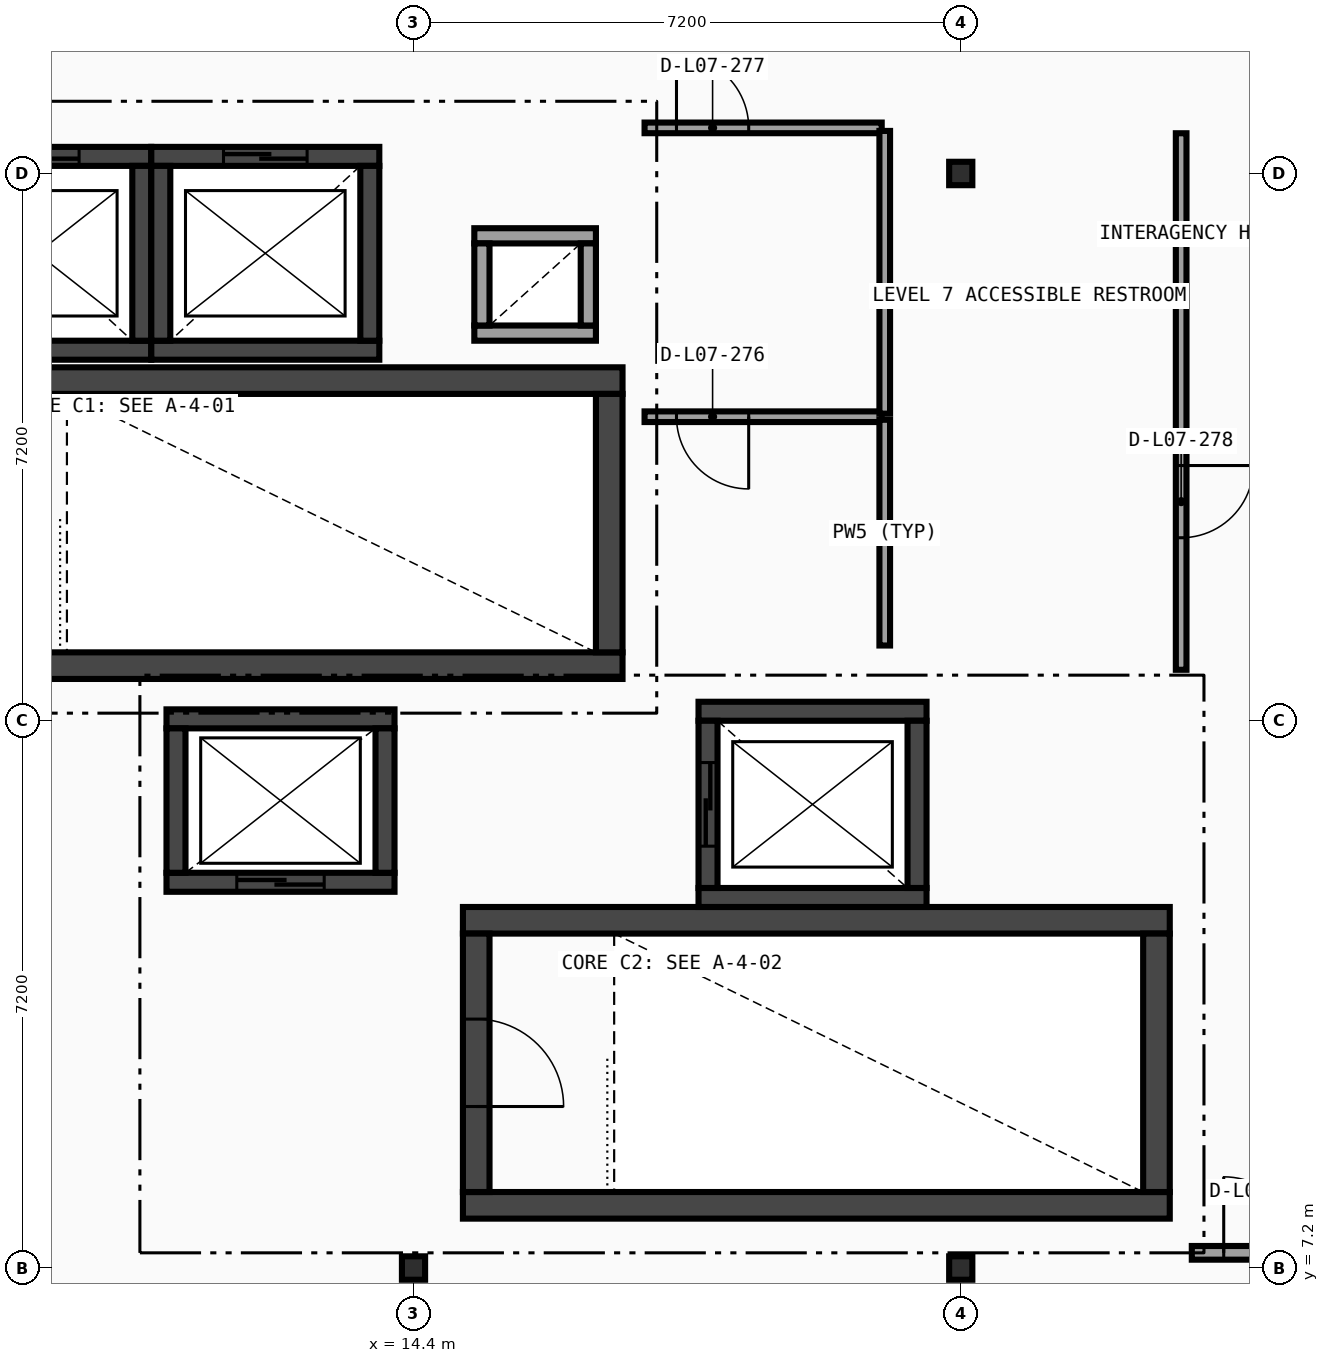
"""IFC4 building model, lengths in metres.
Left out: names, types, materials, properties, quantities, classifications, styles, units other than length and angle.
Written with IfcOpenShell. Run it as: python <this file> out.ifc"""

import sys

from ifc_helpers import new_model, si_unit, direction, frame, frame_2d, origin, origin_2d, place, context, subcontext, project, spatial, rectangle, i_section, extrude, element, fill, save


model = new_model("IFC4")
c1 = context("Model", 3, precision=1e-05, world=origin(), true_north=direction((0.0, 1.0)))
c2 = subcontext(c1, "Body", "Model", "MODEL_VIEW")
j1 = project(units=[si_unit("LENGTHUNIT", "METRE"), si_unit("PLANEANGLEUNIT", "RADIAN")], contexts=[c1])
p1 = place(None, origin())
s1 = spatial("IfcSite", under=j1, at=p1, CompositionType="ELEMENT")
p2 = place(p1, origin())
s2 = spatial("IfcBuilding", under=s1, at=p2, CompositionType="ELEMENT")
p3 = place(p2, frame((0.0, 0.0, 31.05)))
s3 = spatial("IfcBuildingStorey", under=s2, at=p3, CompositionType="ELEMENT", Elevation=31.05)
for number, where, z_axis, x_axis in (
    (1, (14.4, 7.2, 0.0), (0.0, 0.0, 1.0), (1.0, 0.0, 0.0)),
    (2, (21.6, 7.2, 0.0), (0.0, 0.0, 1.0), (1.0, 0.0, 0.0)),
    (3, (21.6, 21.6, 0.0), (0.0, 0.0, 1.0), (1.0, 0.0, 0.0)),
):
    element("IfcColumn", number, at=place(p3, frame(where, z_axis=z_axis, x_axis=x_axis)), inside=s3, PredefinedType="COLUMN", context=c2, shape_type="SweptSolid", body=[
        extrude(i_section(OverallWidth=0.305, OverallDepth=0.308, WebThickness=0.01, FlangeThickness=0.015, FilletRadius=0.015, at=origin_2d()), origin(), (0.0, 0.0, 1.0), 4.2),
    ])
for number, where, z_axis, x_axis in (
    (4, (7.85, 15.125, 0.0), (0.0, 0.0, 1.0), (1.0, 0.0, 0.0)),
    (5, (17.15, 18.875, 0.0), (0.0, 0.0, 1.0), (-1.0, 0.0, 0.0)),
):
    element("IfcWall", number, at=place(p3, frame(where, z_axis=z_axis, x_axis=x_axis)), inside=s3, PredefinedType="SHEAR", context=c2, shape_type="SweptSolid", body=[
        extrude(rectangle(XDim=9.3, YDim=0.35, at=frame_2d((4.65, 0.0))), origin(), (0.0, 0.0, 1.0), 3.95),
    ])
p4 = place(p3, frame((16.975, 15.3, 0.0), z_axis=(0.0, 0.0, 1.0), x_axis=(0.0, 1.0, 0.0)))
e6 = element("IfcWall", 6, at=p4, inside=s3, PredefinedType="SHEAR", context=c2, shape_type="SweptSolid", body=[
    extrude(rectangle(XDim=3.4, YDim=0.35, at=frame_2d((1.7, 0.0))), origin(), (0.0, 0.0, 1.0), 3.95),
])
p5 = place(p3, frame((7.95, 19.275, 0.0), z_axis=(0.0, 0.0, 1.0), x_axis=(1.0, 0.0, 0.0)))
e7 = element("IfcWall", 7, at=p5, inside=s3, PredefinedType="SHEAR", context=c2, shape_type="SweptSolid", body=[
    extrude(rectangle(XDim=3.0, YDim=0.25, at=frame_2d((1.5, 0.0))), origin(), (0.0, 0.0, 1.0), 3.95),
])
p6 = place(p3, frame((10.95, 21.825, 0.0), z_axis=(0.0, 0.0, 1.0), x_axis=(-1.0, 0.0, 0.0)))
e8 = element("IfcWall", 8, at=p6, inside=s3, PredefinedType="SHEAR", context=c2, shape_type="SweptSolid", body=[
    extrude(rectangle(XDim=3.0, YDim=0.25, at=frame_2d((1.5, 0.0))), origin(), (0.0, 0.0, 1.0), 3.95),
])
p7 = place(p6, frame((0.95, 0.0, 0.0)))
e9 = element("IfcOpeningElement", 9, at=p7, cuts=e8, PredefinedType="OPENING", context=c2, shape_type="SweptSolid", body=[
    extrude(rectangle(XDim=1.1, YDim=2.1, at=frame_2d((0.55, 1.05))), frame((0.0, 0.135, 0.0), z_axis=(0.0, -1.0, 0.0), x_axis=(1.0, 0.0, 0.0)), (0.0, 0.0, 1.0), 0.27),
])
p8 = place(p3, frame((10.825, 19.4, 0.0), z_axis=(0.0, 0.0, 1.0), x_axis=(0.0, 1.0, 0.0)))
e10 = element("IfcWall", 10, at=p8, inside=s3, PredefinedType="SHEAR", context=c2, shape_type="SweptSolid", body=[
    extrude(rectangle(XDim=2.3, YDim=0.25, at=frame_2d((1.15, 0.0))), origin(), (0.0, 0.0, 1.0), 3.95),
])
p9 = place(p3, frame((10.95, 19.275, 0.0), z_axis=(0.0, 0.0, 1.0), x_axis=(1.0, 0.0, 0.0)))
e11 = element("IfcWall", 11, at=p9, inside=s3, PredefinedType="SHEAR", context=c2, shape_type="SweptSolid", body=[
    extrude(rectangle(XDim=3.0, YDim=0.25, at=frame_2d((1.5, 0.0))), origin(), (0.0, 0.0, 1.0), 3.95),
])
p10 = place(p3, frame((13.95, 21.825, 0.0), z_axis=(0.0, 0.0, 1.0), x_axis=(-1.0, 0.0, 0.0)))
e12 = element("IfcWall", 12, at=p10, inside=s3, PredefinedType="SHEAR", context=c2, shape_type="SweptSolid", body=[
    extrude(rectangle(XDim=3.0, YDim=0.25, at=frame_2d((1.5, 0.0))), origin(), (0.0, 0.0, 1.0), 3.95),
])
p11 = place(p10, frame((0.95, 0.0, 0.0)))
e13 = element("IfcOpeningElement", 13, at=p11, cuts=e12, PredefinedType="OPENING", context=c2, shape_type="SweptSolid", body=[
    extrude(rectangle(XDim=1.1, YDim=2.1, at=frame_2d((0.55, 1.05))), frame((0.0, 0.135, 0.0), z_axis=(0.0, -1.0, 0.0), x_axis=(1.0, 0.0, 0.0)), (0.0, 0.0, 1.0), 0.27),
])
for number, where, z_axis, x_axis in (
    (14, (11.075, 21.7, 0.0), (0.0, 0.0, 1.0), (0.0, -1.0, 0.0)),
    (15, (13.825, 19.4, 0.0), (0.0, 0.0, 1.0), (0.0, 1.0, 0.0)),
):
    element("IfcWall", number, at=place(p3, frame(where, z_axis=z_axis, x_axis=x_axis)), inside=s3, PredefinedType="SHEAR", context=c2, shape_type="SweptSolid", body=[
        extrude(rectangle(XDim=2.3, YDim=0.25, at=frame_2d((1.15, 0.0))), origin(), (0.0, 0.0, 1.0), 3.95),
    ])
for number, where, z_axis, x_axis in (
    (16, (15.05, 8.025, 0.0), (0.0, 0.0, 1.0), (1.0, 0.0, 0.0)),
    (17, (24.35, 11.775, 0.0), (0.0, 0.0, 1.0), (-1.0, 0.0, 0.0)),
):
    element("IfcWall", number, at=place(p3, frame(where, z_axis=z_axis, x_axis=x_axis)), inside=s3, PredefinedType="SHEAR", context=c2, shape_type="SweptSolid", body=[
        extrude(rectangle(XDim=9.3, YDim=0.35, at=frame_2d((4.65, 0.0))), origin(), (0.0, 0.0, 1.0), 3.95),
    ])
p12 = place(p3, frame((15.225, 11.6, 0.0), z_axis=(0.0, 0.0, 1.0), x_axis=(0.0, -1.0, 0.0)))
e18 = element("IfcWall", 18, at=p12, inside=s3, PredefinedType="SHEAR", context=c2, shape_type="SweptSolid", body=[
    extrude(rectangle(XDim=3.4, YDim=0.35, at=frame_2d((1.7, 0.0))), origin(), (0.0, 0.0, 1.0), 3.95),
])
p13 = place(p12, frame((1.125, 0.0, 0.0)))
e19 = element("IfcOpeningElement", 19, at=p13, cuts=e18, PredefinedType="OPENING", context=c2, shape_type="SweptSolid", body=[
    extrude(rectangle(XDim=1.15, YDim=2.1, at=frame_2d((0.575, 1.05))), frame((0.0, 0.185, 0.0), z_axis=(0.0, -1.0, 0.0), x_axis=(1.0, 0.0, 0.0)), (0.0, 0.0, 1.0), 0.37),
])
p14 = place(p3, frame((24.175, 8.2, 0.0), z_axis=(0.0, 0.0, 1.0), x_axis=(0.0, 1.0, 0.0)))
e20 = element("IfcWall", 20, at=p14, inside=s3, PredefinedType="SHEAR", context=c2, shape_type="SweptSolid", body=[
    extrude(rectangle(XDim=3.4, YDim=0.35, at=frame_2d((1.7, 0.0))), origin(), (0.0, 0.0, 1.0), 3.95),
])
p15 = place(p3, frame((11.15, 12.275, 0.0), z_axis=(0.0, 0.0, 1.0), x_axis=(1.0, 0.0, 0.0)))
e21 = element("IfcWall", 21, at=p15, inside=s3, PredefinedType="SHEAR", context=c2, shape_type="SweptSolid", body=[
    extrude(rectangle(XDim=3.0, YDim=0.25, at=frame_2d((1.5, 0.0))), origin(), (0.0, 0.0, 1.0), 3.95),
])
p16 = place(p15, frame((0.925, 0.0, 0.0)))
e22 = element("IfcOpeningElement", 22, at=p16, cuts=e21, PredefinedType="OPENING", context=c2, shape_type="SweptSolid", body=[
    extrude(rectangle(XDim=1.15, YDim=2.1, at=frame_2d((0.575, 1.05))), frame((0.0, 0.135, 0.0), z_axis=(0.0, -1.0, 0.0), x_axis=(1.0, 0.0, 0.0)), (0.0, 0.0, 1.0), 0.27),
])
p17 = place(p3, frame((14.15, 14.425, 0.0), z_axis=(0.0, 0.0, 1.0), x_axis=(-1.0, 0.0, 0.0)))
e23 = element("IfcWall", 23, at=p17, inside=s3, PredefinedType="SHEAR", context=c2, shape_type="SweptSolid", body=[
    extrude(rectangle(XDim=3.0, YDim=0.25, at=frame_2d((1.5, 0.0))), origin(), (0.0, 0.0, 1.0), 3.95),
])
for number, where, z_axis, x_axis in (
    (24, (11.275, 14.3, 0.0), (0.0, 0.0, 1.0), (0.0, -1.0, 0.0)),
    (25, (14.025, 12.4, 0.0), (0.0, 0.0, 1.0), (0.0, 1.0, 0.0)),
):
    element("IfcWall", number, at=place(p3, frame(where, z_axis=z_axis, x_axis=x_axis)), inside=s3, PredefinedType="SHEAR", context=c2, shape_type="SweptSolid", body=[
        extrude(rectangle(XDim=1.9, YDim=0.25, at=frame_2d((0.95, 0.0))), origin(), (0.0, 0.0, 1.0), 3.95),
    ])
for number, where, z_axis, x_axis in (
    (26, (18.15, 12.075, 0.0), (0.0, 0.0, 1.0), (1.0, 0.0, 0.0)),
    (27, (21.15, 14.525, 0.0), (0.0, 0.0, 1.0), (-1.0, 0.0, 0.0)),
):
    element("IfcWall", number, at=place(p3, frame(where, z_axis=z_axis, x_axis=x_axis)), inside=s3, PredefinedType="SHEAR", context=c2, shape_type="SweptSolid", body=[
        extrude(rectangle(XDim=3.0, YDim=0.25, at=frame_2d((1.5, 0.0))), origin(), (0.0, 0.0, 1.0), 3.95),
    ])
p18 = place(p3, frame((18.275, 14.4, 0.0), z_axis=(0.0, 0.0, 1.0), x_axis=(0.0, -1.0, 0.0)))
e28 = element("IfcWall", 28, at=p18, inside=s3, PredefinedType="SHEAR", context=c2, shape_type="SweptSolid", body=[
    extrude(rectangle(XDim=2.2, YDim=0.25, at=frame_2d((1.1, 0.0))), origin(), (0.0, 0.0, 1.0), 3.95),
])
p19 = place(p18, frame((0.55, 0.0, 0.0)))
e29 = element("IfcOpeningElement", 29, at=p19, cuts=e28, PredefinedType="OPENING", context=c2, shape_type="SweptSolid", body=[
    extrude(rectangle(XDim=1.1, YDim=2.1, at=frame_2d((0.55, 1.05))), frame((0.0, 0.135, 0.0), z_axis=(0.0, -1.0, 0.0), x_axis=(1.0, 0.0, 0.0)), (0.0, 0.0, 1.0), 0.27),
])
p20 = place(p3, frame((21.025, 12.2, 0.0), z_axis=(0.0, 0.0, 1.0), x_axis=(0.0, 1.0, 0.0)))
e30 = element("IfcWall", 30, at=p20, inside=s3, PredefinedType="SHEAR", context=c2, shape_type="SweptSolid", body=[
    extrude(rectangle(XDim=2.2, YDim=0.25, at=frame_2d((1.1, 0.0))), origin(), (0.0, 0.0, 1.0), 3.95),
])
for number, where, z_axis, x_axis in (
    (31, (15.2, 19.5, 0.0), (0.0, 0.0, 1.0), (1.0, 0.0, 0.0)),
    (32, (16.8, 20.78, 0.0), (0.0, 0.0, 1.0), (-1.0, 0.0, 0.0)),
):
    element("IfcWall", number, at=place(p3, frame(where, z_axis=z_axis, x_axis=x_axis)), inside=s3, PredefinedType="SOLIDWALL", context=c2, shape_type="SweptSolid", body=[
        extrude(rectangle(XDim=1.6, YDim=0.2, at=frame_2d((0.8, 0.0))), origin(), (0.0, 0.0, 1.0), 3.95),
    ])
for number, where, z_axis, x_axis in (
    (33, (15.3, 20.68, 0.0), (0.0, 0.0, 1.0), (0.0, -1.0, 0.0)),
    (34, (16.7, 19.6, 0.0), (0.0, 0.0, 1.0), (0.0, 1.0, 0.0)),
):
    element("IfcWall", number, at=place(p3, frame(where, z_axis=z_axis, x_axis=x_axis)), inside=s3, PredefinedType="SOLIDWALL", context=c2, shape_type="SweptSolid", body=[
        extrude(rectangle(XDim=1.08, YDim=0.2, at=frame_2d((0.54, 0.0))), origin(), (0.0, 0.0, 1.0), 3.95),
    ])
p21 = place(p3, frame((17.44, 22.2, 0.0), z_axis=(0.0, 0.0, 1.0), x_axis=(1.0, 0.0, 0.0)))
e35 = element("IfcWall", 35, at=p21, inside=s3, PredefinedType="PARTITIONING", context=c2, shape_type="SweptSolid", body=[
    extrude(rectangle(XDim=3.12, YDim=0.14, at=frame_2d((1.56, 0.0))), origin(), (0.0, 0.0, 1.0), 3.95),
])
p22 = place(p21, frame((0.42, 0.0, 0.0)))
e36 = element("IfcOpeningElement", 36, at=p22, cuts=e35, PredefinedType="OPENING", context=c2, shape_type="SweptSolid", body=[
    extrude(rectangle(XDim=0.95, YDim=2.08, at=frame_2d((0.475, 1.04))), frame((0.0, 0.08, 0.0), z_axis=(0.0, -1.0, 0.0), x_axis=(1.0, 0.0, 0.0)), (0.0, 0.0, 1.0), 0.16),
])
p23 = place(p3, frame((24.64, 7.4, 0.0), z_axis=(0.0, 0.0, 1.0), x_axis=(1.0, 0.0, 0.0)))
e37 = element("IfcWall", 37, at=p23, inside=s3, PredefinedType="PARTITIONING", context=c2, shape_type="SweptSolid", body=[
    extrude(rectangle(XDim=3.52, YDim=0.18, at=frame_2d((1.76, 0.0))), origin(), (0.0, 0.0, 1.0), 3.95),
])
p24 = place(p23, frame((0.42, 0.0, 0.0)))
e38 = element("IfcOpeningElement", 38, at=p24, cuts=e37, PredefinedType="OPENING", context=c2, shape_type="SweptSolid", body=[
    extrude(rectangle(XDim=1.0, YDim=2.1, at=frame_2d((0.5, 1.05))), frame((0.0, 0.1, 0.0), z_axis=(0.0, -1.0, 0.0), x_axis=(1.0, 0.0, 0.0)), (0.0, 0.0, 1.0), 0.2),
])
p25 = place(p3, frame((24.5, 15.071, 0.0), z_axis=(0.0, 0.0, 1.0), x_axis=(0.0, 1.0, 0.0)))
e39 = element("IfcWall", 39, at=p25, inside=s3, PredefinedType="PARTITIONING", context=c2, shape_type="SweptSolid", body=[
    extrude(rectangle(XDim=7.059, YDim=0.14, at=frame_2d((3.529, 0.0))), origin(), (0.0, 0.0, 1.0), 3.95),
])
p26 = place(p25, frame((1.737, 0.0, 0.0)))
e40 = element("IfcOpeningElement", 40, at=p26, cuts=e39, PredefinedType="OPENING", context=c2, shape_type="SweptSolid", body=[
    extrude(rectangle(XDim=0.95, YDim=2.08, at=frame_2d((0.475, 1.04))), frame((0.0, 0.08, 0.0), z_axis=(0.0, -1.0, 0.0), x_axis=(1.0, 0.0, 0.0)), (0.0, 0.0, 1.0), 0.16),
])
p27 = place(p3, frame((17.44, 18.4, 0.0), z_axis=(0.0, 0.0, 1.0), x_axis=(1.0, 0.0, 0.0)))
e41 = element("IfcWall", 41, at=p27, inside=s3, PredefinedType="PARTITIONING", context=c2, shape_type="SweptSolid", body=[
    extrude(rectangle(XDim=3.12, YDim=0.14, at=frame_2d((1.56, 0.0))), origin(), (0.0, 0.0, 1.0), 3.95),
])
p28 = place(p27, frame((0.42, 0.0, 0.0)))
e42 = element("IfcOpeningElement", 42, at=p28, cuts=e41, PredefinedType="OPENING", context=c2, shape_type="SweptSolid", body=[
    extrude(rectangle(XDim=0.95, YDim=2.08, at=frame_2d((0.475, 1.04))), frame((0.0, 0.08, 0.0), z_axis=(0.0, -1.0, 0.0), x_axis=(1.0, 0.0, 0.0)), (0.0, 0.0, 1.0), 0.16),
])
p29 = place(p3, frame((20.6, 15.39, 0.0), z_axis=(0.0, 0.0, 1.0), x_axis=(0.0, 1.0, 0.0)))
e43 = element("IfcWall", 43, at=p29, inside=s3, PredefinedType="PARTITIONING", context=c2, shape_type="SweptSolid", body=[
    extrude(rectangle(XDim=2.97, YDim=0.14, at=frame_2d((1.485, 0.0))), origin(), (0.0, 0.0, 1.0), 3.95),
])
p30 = place(p3, frame((20.6, 18.44, 0.0), z_axis=(0.0, 0.0, 1.0), x_axis=(0.0, 1.0, 0.0)))
e44 = element("IfcWall", 44, at=p30, inside=s3, PredefinedType="PARTITIONING", context=c2, shape_type="SweptSolid", body=[
    extrude(rectangle(XDim=3.72, YDim=0.14, at=frame_2d((1.86, 0.0))), origin(), (0.0, 0.0, 1.0), 3.95),
])
p31 = place(p7, origin())
e45 = element("IfcDoor", 45, at=p31, inside=s3, OperationType="SLIDING_TO_LEFT", PredefinedType="DOOR", context=c2, shape_type="SweptSolid", body=[
    extrude(rectangle(XDim=1.1, YDim=2.1, at=frame_2d((0.55, 1.05))), frame((0.0, 0.025, 0.0), z_axis=(0.0, -1.0, 0.0), x_axis=(1.0, 0.0, 0.0)), (0.0, 0.0, 1.0), 0.05),
])
fill(e9, e45)
p32 = place(p11, origin())
e46 = element("IfcDoor", 46, at=p32, inside=s3, OperationType="SLIDING_TO_LEFT", PredefinedType="DOOR", context=c2, shape_type="SweptSolid", body=[
    extrude(rectangle(XDim=1.1, YDim=2.1, at=frame_2d((0.55, 1.05))), frame((0.0, 0.025, 0.0), z_axis=(0.0, -1.0, 0.0), x_axis=(1.0, 0.0, 0.0)), (0.0, 0.0, 1.0), 0.05),
])
fill(e13, e46)
p33 = place(p13, frame((1.15, 0.0, 0.0), z_axis=(0.0, 0.0, 1.0), x_axis=(-1.0, 0.0, 0.0)))
e47 = element("IfcDoor", 47, at=p33, inside=s3, OperationType="SINGLE_SWING_LEFT", PredefinedType="DOOR", context=c2, shape_type="SweptSolid", body=[
    extrude(rectangle(XDim=1.15, YDim=2.1, at=frame_2d((0.575, 1.05))), frame((0.0, 0.025, 0.0), z_axis=(0.0, -1.0, 0.0), x_axis=(1.0, 0.0, 0.0)), (0.0, 0.0, 1.0), 0.05),
])
fill(e19, e47)
p34 = place(p16, origin())
e48 = element("IfcDoor", 48, at=p34, inside=s3, OperationType="SLIDING_TO_RIGHT", PredefinedType="DOOR", context=c2, shape_type="SweptSolid", body=[
    extrude(rectangle(XDim=1.15, YDim=2.1, at=frame_2d((0.575, 1.05))), frame((0.0, 0.025, 0.0), z_axis=(0.0, -1.0, 0.0), x_axis=(1.0, 0.0, 0.0)), (0.0, 0.0, 1.0), 0.05),
])
fill(e22, e48)
p35 = place(p19, origin())
e49 = element("IfcDoor", 49, at=p35, inside=s3, OperationType="SLIDING_TO_LEFT", PredefinedType="DOOR", context=c2, shape_type="SweptSolid", body=[
    extrude(rectangle(XDim=1.1, YDim=2.1, at=frame_2d((0.55, 1.05))), frame((0.0, 0.025, 0.0), z_axis=(0.0, -1.0, 0.0), x_axis=(1.0, 0.0, 0.0)), (0.0, 0.0, 1.0), 0.05),
])
fill(e29, e49)
p36 = place(p24, origin())
e50 = element("IfcDoor", 50, at=p36, inside=s3, OperationType="SINGLE_SWING_LEFT", PredefinedType="DOOR", context=c2, shape_type="SweptSolid", body=[
    extrude(rectangle(XDim=1.0, YDim=2.1, at=frame_2d((0.5, 1.05))), frame((0.0, 0.025, 0.0), z_axis=(0.0, -1.0, 0.0), x_axis=(1.0, 0.0, 0.0)), (0.0, 0.0, 1.0), 0.05),
])
fill(e38, e50)
p37 = place(p28, origin())
e51 = element("IfcDoor", 51, at=p37, inside=s3, OperationType="SINGLE_SWING_RIGHT", PredefinedType="DOOR", context=c2, shape_type="SweptSolid", body=[
    extrude(rectangle(XDim=0.95, YDim=2.08, at=frame_2d((0.475, 1.04))), frame((0.0, 0.025, 0.0), z_axis=(0.0, -1.0, 0.0), x_axis=(1.0, 0.0, 0.0)), (0.0, 0.0, 1.0), 0.05),
])
fill(e42, e51)
p38 = place(p22, origin())
e52 = element("IfcDoor", 52, at=p38, inside=s3, OperationType="SINGLE_SWING_LEFT", PredefinedType="DOOR", context=c2, shape_type="SweptSolid", body=[
    extrude(rectangle(XDim=0.95, YDim=2.08, at=frame_2d((0.475, 1.04))), frame((0.0, 0.025, 0.0), z_axis=(0.0, -1.0, 0.0), x_axis=(1.0, 0.0, 0.0)), (0.0, 0.0, 1.0), 0.05),
])
fill(e36, e52)
p39 = place(p26, origin())
e53 = element("IfcDoor", 53, at=p39, inside=s3, OperationType="SINGLE_SWING_RIGHT", PredefinedType="DOOR", context=c2, shape_type="SweptSolid", body=[
    extrude(rectangle(XDim=0.95, YDim=2.08, at=frame_2d((0.475, 1.04))), frame((0.0, 0.025, 0.0), z_axis=(0.0, -1.0, 0.0), x_axis=(1.0, 0.0, 0.0)), (0.0, 0.0, 1.0), 0.05),
])
fill(e40, e53)
save(model, sys.argv[1])
